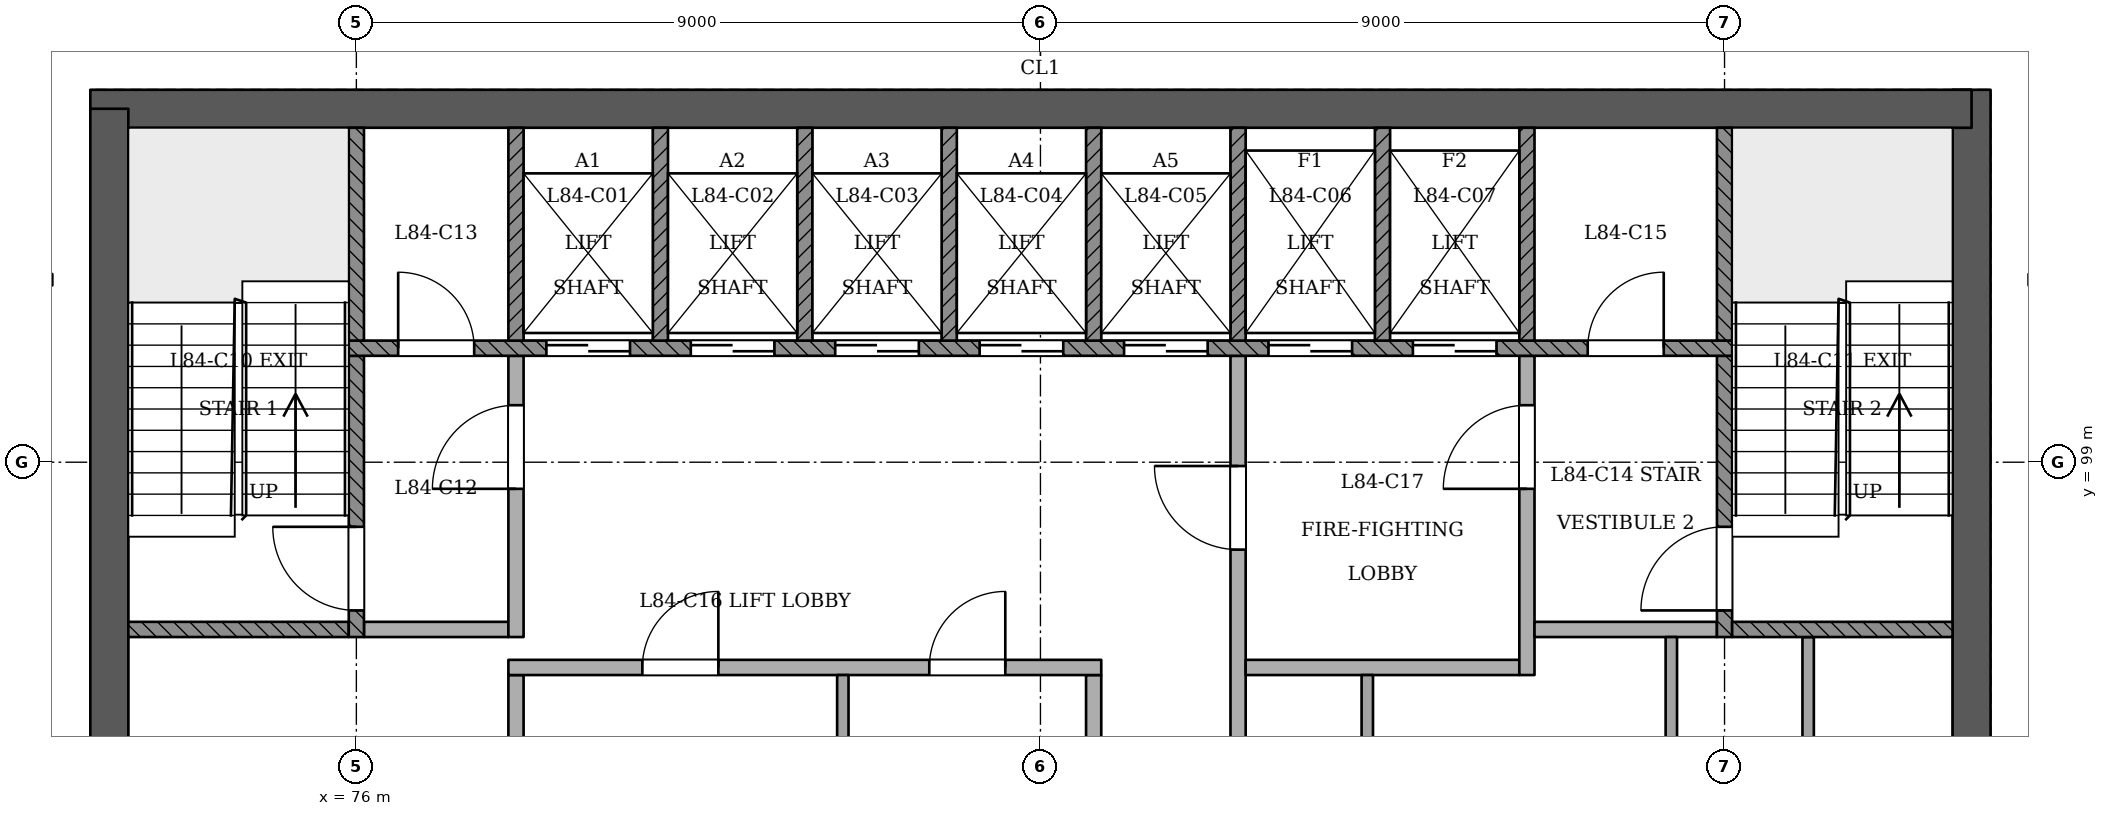
"""IFC4 building model, lengths in metres.
Left out: names, types, materials, properties, quantities, classifications, styles, units other than length and angle.
Written with IfcOpenShell. Run it as: python <this file> out.ifc"""

import sys

from ifc_helpers import new_model, si_unit, direction, frame, frame_2d, origin, place, context, subcontext, project, spatial, rectangle, extrude, element, fill, save


model = new_model("IFC4")
c1 = context("Model", 3, precision=1e-05, world=origin(), true_north=direction((0.0, 1.0)))
c2 = subcontext(c1, "Body", "Model", "MODEL_VIEW")
j1 = project(units=[si_unit("LENGTHUNIT", "METRE"), si_unit("PLANEANGLEUNIT", "RADIAN")], contexts=[c1])
p1 = place(None, origin())
s1 = spatial("IfcSite", under=j1, at=p1, CompositionType="ELEMENT")
p2 = place(p1, origin())
s2 = spatial("IfcBuilding", under=s1, at=p2, CompositionType="ELEMENT")
p3 = place(p2, frame((0.0, 0.0, 323.8)))
s3 = spatial("IfcBuildingStorey", under=s2, at=p3, CompositionType="ELEMENT", Elevation=323.8)
p4 = place(p3, frame((97.25, 93.15, 0.0), z_axis=(0.0, 0.0, 1.0), x_axis=(0.0, 1.0, 0.0)))
e1 = element("IfcWall", 1, at=p4, inside=s3, PredefinedType="SHEAR", context=c2, shape_type="SweptSolid", body=[
    extrude(rectangle(XDim=10.75, YDim=0.5, at=frame_2d((5.375, 0.0))), origin(), (0.0, 0.0, 1.0), 3.6),
])
p5 = place(p3, frame((97.25, 103.65, 0.0), z_axis=(0.0, 0.0, 1.0), x_axis=(-1.0, 0.0, 0.0)))
e2 = element("IfcWall", 2, at=p5, inside=s3, PredefinedType="SHEAR", context=c2, shape_type="SweptSolid", body=[
    extrude(rectangle(XDim=24.75, YDim=0.5, at=frame_2d((12.375, 0.0))), origin(), (0.0, 0.0, 1.0), 3.6),
])
p6 = place(p3, frame((72.75, 103.65, 0.0), z_axis=(0.0, 0.0, 1.0), x_axis=(0.0, -1.0, 0.0)))
e3 = element("IfcWall", 3, at=p6, inside=s3, PredefinedType="SHEAR", context=c2, shape_type="SweptSolid", body=[
    extrude(rectangle(XDim=10.75, YDim=0.5, at=frame_2d((5.375, 0.0))), origin(), (0.0, 0.0, 1.0), 3.6),
])
p7 = place(p3, frame((78.1, 93.4, 0.0), z_axis=(0.0, 0.0, 1.0), x_axis=(0.0, 1.0, 0.0)))
e4 = element("IfcWall", 4, at=p7, inside=s3, PredefinedType="PARTITIONING", context=c2, shape_type="SweptSolid", body=[
    extrude(rectangle(XDim=2.8, YDim=0.2, at=frame_2d((1.4, 0.0))), origin(), (0.0, 0.0, 1.0), 3.2),
])
p8 = place(p3, frame((82.4, 93.4, 0.0), z_axis=(0.0, 0.0, 1.0), x_axis=(0.0, 1.0, 0.0)))
e5 = element("IfcWall", 5, at=p8, inside=s3, PredefinedType="PARTITIONING", context=c2, shape_type="SweptSolid", body=[
    extrude(rectangle(XDim=2.8, YDim=0.15, at=frame_2d((1.4, 0.0))), origin(), (0.0, 0.0, 1.0), 3.2),
])
p9 = place(p3, frame((85.7, 93.4, 0.0), z_axis=(0.0, 0.0, 1.0), x_axis=(0.0, 1.0, 0.0)))
e6 = element("IfcWall", 6, at=p9, inside=s3, PredefinedType="PARTITIONING", context=c2, shape_type="SweptSolid", body=[
    extrude(rectangle(XDim=2.8, YDim=0.2, at=frame_2d((1.4, 0.0))), origin(), (0.0, 0.0, 1.0), 3.2),
])
p10 = place(p3, frame((87.6, 93.4, 0.0), z_axis=(0.0, 0.0, 1.0), x_axis=(0.0, 1.0, 0.0)))
e7 = element("IfcWall", 7, at=p10, inside=s3, PredefinedType="PARTITIONING", context=c2, shape_type="SweptSolid", body=[
    extrude(rectangle(XDim=7.0, YDim=0.2, at=frame_2d((3.5, 0.0))), origin(), (0.0, 0.0, 1.0), 3.2),
])
p11 = place(p10, frame((4.45, 0.0, 0.0)))
e8 = element("IfcOpeningElement", 8, at=p11, cuts=e7, PredefinedType="OPENING", context=c2, shape_type="SweptSolid", body=[
    extrude(rectangle(XDim=1.1, YDim=2.1, at=frame_2d((0.55, 1.05))), frame((0.0, 0.11, 0.0), z_axis=(0.0, -1.0, 0.0), x_axis=(1.0, 0.0, 0.0)), (0.0, 0.0, 1.0), 0.221),
])
p12 = place(p3, frame((89.3, 93.4, 0.0), z_axis=(0.0, 0.0, 1.0), x_axis=(0.0, 1.0, 0.0)))
e9 = element("IfcWall", 9, at=p12, inside=s3, PredefinedType="PARTITIONING", context=c2, shape_type="SweptSolid", body=[
    extrude(rectangle(XDim=2.8, YDim=0.15, at=frame_2d((1.4, 0.0))), origin(), (0.0, 0.0, 1.0), 3.2),
])
for number, where, z_axis, x_axis in (
    (10, (93.3, 93.4, 0.0), (0.0, 0.0, 1.0), (0.0, 1.0, 0.0)),
    (11, (95.1, 93.4, 0.0), (0.0, 0.0, 1.0), (0.0, 1.0, 0.0)),
):
    element("IfcWall", number, at=place(p3, frame(where, z_axis=z_axis, x_axis=x_axis)), inside=s3, PredefinedType="PARTITIONING", context=c2, shape_type="SweptSolid", body=[
        extrude(rectangle(XDim=3.3, YDim=0.15, at=frame_2d((1.65, 0.0))), origin(), (0.0, 0.0, 1.0), 3.2),
    ])
p13 = place(p3, frame((78.0, 96.3, 0.0), z_axis=(0.0, 0.0, 1.0), x_axis=(1.0, 0.0, 0.0)))
e12 = element("IfcWall", 12, at=p13, inside=s3, PredefinedType="PARTITIONING", context=c2, shape_type="SweptSolid", body=[
    extrude(rectangle(XDim=7.8, YDim=0.2, at=frame_2d((3.9, 0.0))), origin(), (0.0, 0.0, 1.0), 3.2),
])
p14 = place(p13, frame((1.762, 0.0, 0.0)))
e13 = element("IfcOpeningElement", 13, at=p14, cuts=e12, PredefinedType="OPENING", context=c2, shape_type="SweptSolid", body=[
    extrude(rectangle(XDim=1.0, YDim=2.1, at=frame_2d((0.5, 1.05))), frame((0.0, 0.11, 0.0), z_axis=(0.0, -1.0, 0.0), x_axis=(1.0, 0.0, 0.0)), (0.0, 0.0, 1.0), 0.221),
])
p15 = place(p13, frame((5.538, 0.0, 0.0)))
e14 = element("IfcOpeningElement", 14, at=p15, cuts=e12, PredefinedType="OPENING", context=c2, shape_type="SweptSolid", body=[
    extrude(rectangle(XDim=1.0, YDim=2.1, at=frame_2d((0.5, 1.05))), frame((0.0, 0.11, 0.0), z_axis=(0.0, -1.0, 0.0), x_axis=(1.0, 0.0, 0.0)), (0.0, 0.0, 1.0), 0.221),
])
p16 = place(p3, frame((87.7, 96.3, 0.0), z_axis=(0.0, 0.0, 1.0), x_axis=(1.0, 0.0, 0.0)))
e15 = element("IfcWall", 15, at=p16, inside=s3, PredefinedType="PARTITIONING", context=c2, shape_type="SweptSolid", body=[
    extrude(rectangle(XDim=3.6, YDim=0.2, at=frame_2d((1.8, 0.0))), origin(), (0.0, 0.0, 1.0), 3.2),
])
p17 = place(p3, frame((91.4, 96.2, 0.0), z_axis=(0.0, 0.0, 1.0), x_axis=(0.0, 1.0, 0.0)))
e16 = element("IfcWall", 16, at=p17, inside=s3, PredefinedType="PARTITIONING", context=c2, shape_type="SweptSolid", body=[
    extrude(rectangle(XDim=4.2, YDim=0.2, at=frame_2d((2.1, 0.0))), origin(), (0.0, 0.0, 1.0), 3.2),
])
p18 = place(p17, frame((2.45, 0.0, 0.0)))
e17 = element("IfcOpeningElement", 17, at=p18, cuts=e16, PredefinedType="OPENING", context=c2, shape_type="SweptSolid", body=[
    extrude(rectangle(XDim=1.1, YDim=2.1, at=frame_2d((0.55, 1.05))), frame((0.0, 0.11, 0.0), z_axis=(0.0, -1.0, 0.0), x_axis=(1.0, 0.0, 0.0)), (0.0, 0.0, 1.0), 0.221),
])
p19 = place(p3, frame((73.0, 96.8, 0.0), z_axis=(0.0, 0.0, 1.0), x_axis=(1.0, 0.0, 0.0)))
e18 = element("IfcWall", 18, at=p19, inside=s3, PredefinedType="SOLIDWALL", context=c2, shape_type="SweptSolid", body=[
    extrude(rectangle(XDim=2.9, YDim=0.2, at=frame_2d((1.45, 0.0))), origin(), (0.0, 0.0, 1.0), 3.2),
])
p20 = place(p3, frame((76.0, 96.7, 0.0), z_axis=(0.0, 0.0, 1.0), x_axis=(0.0, 1.0, 0.0)))
e19 = element("IfcWall", 19, at=p20, inside=s3, PredefinedType="SOLIDWALL", context=c2, shape_type="SweptSolid", body=[
    extrude(rectangle(XDim=3.7, YDim=0.2, at=frame_2d((1.85, 0.0))), origin(), (0.0, 0.0, 1.0), 3.2),
])
p21 = place(p20, frame((0.35, 0.0, 0.0)))
e20 = element("IfcOpeningElement", 20, at=p21, cuts=e19, PredefinedType="OPENING", context=c2, shape_type="SweptSolid", body=[
    extrude(rectangle(XDim=1.1, YDim=2.1, at=frame_2d((0.55, 1.05))), frame((0.0, 0.11, 0.0), z_axis=(0.0, -1.0, 0.0), x_axis=(1.0, 0.0, 0.0)), (0.0, 0.0, 1.0), 0.221),
])
p22 = place(p3, frame((76.1, 96.8, 0.0), z_axis=(0.0, 0.0, 1.0), x_axis=(1.0, 0.0, 0.0)))
e21 = element("IfcWall", 21, at=p22, inside=s3, PredefinedType="PARTITIONING", context=c2, shape_type="SweptSolid", body=[
    extrude(rectangle(XDim=1.9, YDim=0.2, at=frame_2d((0.95, 0.0))), origin(), (0.0, 0.0, 1.0), 3.2),
])
p23 = place(p3, frame((78.1, 96.7, 0.0), z_axis=(0.0, 0.0, 1.0), x_axis=(0.0, 1.0, 0.0)))
e22 = element("IfcWall", 22, at=p23, inside=s3, PredefinedType="PARTITIONING", context=c2, shape_type="SweptSolid", body=[
    extrude(rectangle(XDim=3.7, YDim=0.2, at=frame_2d((1.85, 0.0))), origin(), (0.0, 0.0, 1.0), 3.2),
])
p24 = place(p23, frame((1.95, 0.0, 0.0)))
e23 = element("IfcOpeningElement", 23, at=p24, cuts=e22, PredefinedType="OPENING", context=c2, shape_type="SweptSolid", body=[
    extrude(rectangle(XDim=1.1, YDim=2.1, at=frame_2d((0.55, 1.05))), frame((0.0, 0.11, 0.0), z_axis=(0.0, -1.0, 0.0), x_axis=(1.0, 0.0, 0.0)), (0.0, 0.0, 1.0), 0.221),
])
p25 = place(p3, frame((91.5, 96.8, 0.0), z_axis=(0.0, 0.0, 1.0), x_axis=(1.0, 0.0, 0.0)))
e24 = element("IfcWall", 24, at=p25, inside=s3, PredefinedType="PARTITIONING", context=c2, shape_type="SweptSolid", body=[
    extrude(rectangle(XDim=2.4, YDim=0.2, at=frame_2d((1.2, 0.0))), origin(), (0.0, 0.0, 1.0), 3.2),
])
p26 = place(p3, frame((94.0, 96.7, 0.0), z_axis=(0.0, 0.0, 1.0), x_axis=(0.0, 1.0, 0.0)))
e25 = element("IfcWall", 25, at=p26, inside=s3, PredefinedType="SOLIDWALL", context=c2, shape_type="SweptSolid", body=[
    extrude(rectangle(XDim=3.7, YDim=0.2, at=frame_2d((1.85, 0.0))), origin(), (0.0, 0.0, 1.0), 3.2),
])
p27 = place(p26, frame((0.35, 0.0, 0.0)))
e26 = element("IfcOpeningElement", 26, at=p27, cuts=e25, PredefinedType="OPENING", context=c2, shape_type="SweptSolid", body=[
    extrude(rectangle(XDim=1.1, YDim=2.1, at=frame_2d((0.55, 1.05))), frame((0.0, 0.11, 0.0), z_axis=(0.0, -1.0, 0.0), x_axis=(1.0, 0.0, 0.0)), (0.0, 0.0, 1.0), 0.221),
])
p28 = place(p3, frame((94.1, 96.8, 0.0), z_axis=(0.0, 0.0, 1.0), x_axis=(1.0, 0.0, 0.0)))
e27 = element("IfcWall", 27, at=p28, inside=s3, PredefinedType="SOLIDWALL", context=c2, shape_type="SweptSolid", body=[
    extrude(rectangle(XDim=2.9, YDim=0.2, at=frame_2d((1.45, 0.0))), origin(), (0.0, 0.0, 1.0), 3.2),
])
p29 = place(p3, frame((75.9, 100.5, 0.0), z_axis=(0.0, 0.0, 1.0), x_axis=(1.0, 0.0, 0.0)))
e28 = element("IfcWall", 28, at=p29, inside=s3, PredefinedType="SOLIDWALL", context=c2, shape_type="SweptSolid", body=[
    extrude(rectangle(XDim=18.2, YDim=0.2, at=frame_2d((9.1, 0.0))), origin(), (0.0, 0.0, 1.0), 3.2),
])
p30 = place(p29, frame((2.6, 0.0, 0.0)))
e29 = element("IfcOpeningElement", 29, at=p30, cuts=e28, PredefinedType="OPENING", context=c2, shape_type="SweptSolid", body=[
    extrude(rectangle(XDim=1.1, YDim=2.1, at=frame_2d((0.55, 1.05))), frame((0.0, 0.11, 0.0), z_axis=(0.0, -1.0, 0.0), x_axis=(1.0, 0.0, 0.0)), (0.0, 0.0, 1.0), 0.221),
])
p31 = place(p29, frame((4.5, 0.0, 0.0)))
e30 = element("IfcOpeningElement", 30, at=p31, cuts=e28, PredefinedType="OPENING", context=c2, shape_type="SweptSolid", body=[
    extrude(rectangle(XDim=1.1, YDim=2.1, at=frame_2d((0.55, 1.05))), frame((0.0, 0.11, 0.0), z_axis=(0.0, -1.0, 0.0), x_axis=(1.0, 0.0, 0.0)), (0.0, 0.0, 1.0), 0.221),
])
p32 = place(p29, frame((6.4, 0.0, 0.0)))
e31 = element("IfcOpeningElement", 31, at=p32, cuts=e28, PredefinedType="OPENING", context=c2, shape_type="SweptSolid", body=[
    extrude(rectangle(XDim=1.1, YDim=2.1, at=frame_2d((0.55, 1.05))), frame((0.0, 0.11, 0.0), z_axis=(0.0, -1.0, 0.0), x_axis=(1.0, 0.0, 0.0)), (0.0, 0.0, 1.0), 0.221),
])
p33 = place(p29, frame((8.3, 0.0, 0.0)))
e32 = element("IfcOpeningElement", 32, at=p33, cuts=e28, PredefinedType="OPENING", context=c2, shape_type="SweptSolid", body=[
    extrude(rectangle(XDim=1.1, YDim=2.1, at=frame_2d((0.55, 1.05))), frame((0.0, 0.11, 0.0), z_axis=(0.0, -1.0, 0.0), x_axis=(1.0, 0.0, 0.0)), (0.0, 0.0, 1.0), 0.221),
])
p34 = place(p29, frame((10.2, 0.0, 0.0)))
e33 = element("IfcOpeningElement", 33, at=p34, cuts=e28, PredefinedType="OPENING", context=c2, shape_type="SweptSolid", body=[
    extrude(rectangle(XDim=1.1, YDim=2.1, at=frame_2d((0.55, 1.05))), frame((0.0, 0.11, 0.0), z_axis=(0.0, -1.0, 0.0), x_axis=(1.0, 0.0, 0.0)), (0.0, 0.0, 1.0), 0.221),
])
p35 = place(p29, frame((12.1, 0.0, 0.0)))
e34 = element("IfcOpeningElement", 34, at=p35, cuts=e28, PredefinedType="OPENING", context=c2, shape_type="SweptSolid", body=[
    extrude(rectangle(XDim=1.1, YDim=2.1, at=frame_2d((0.55, 1.05))), frame((0.0, 0.11, 0.0), z_axis=(0.0, -1.0, 0.0), x_axis=(1.0, 0.0, 0.0)), (0.0, 0.0, 1.0), 0.221),
])
p36 = place(p29, frame((14.0, 0.0, 0.0)))
e35 = element("IfcOpeningElement", 35, at=p36, cuts=e28, PredefinedType="OPENING", context=c2, shape_type="SweptSolid", body=[
    extrude(rectangle(XDim=1.1, YDim=2.1, at=frame_2d((0.55, 1.05))), frame((0.0, 0.11, 0.0), z_axis=(0.0, -1.0, 0.0), x_axis=(1.0, 0.0, 0.0)), (0.0, 0.0, 1.0), 0.221),
])
p37 = place(p29, frame((0.65, 0.0, 0.0)))
e36 = element("IfcOpeningElement", 36, at=p37, cuts=e28, PredefinedType="OPENING", context=c2, shape_type="SweptSolid", body=[
    extrude(rectangle(XDim=1.0, YDim=2.1, at=frame_2d((0.5, 1.05))), frame((0.0, 0.11, 0.0), z_axis=(0.0, -1.0, 0.0), x_axis=(1.0, 0.0, 0.0)), (0.0, 0.0, 1.0), 0.221),
])
p38 = place(p29, frame((16.3, 0.0, 0.0)))
e37 = element("IfcOpeningElement", 37, at=p38, cuts=e28, PredefinedType="OPENING", context=c2, shape_type="SweptSolid", body=[
    extrude(rectangle(XDim=1.0, YDim=2.1, at=frame_2d((0.5, 1.05))), frame((0.0, 0.11, 0.0), z_axis=(0.0, -1.0, 0.0), x_axis=(1.0, 0.0, 0.0)), (0.0, 0.0, 1.0), 0.221),
])
for number, where, z_axis, x_axis in (
    (38, (76.0, 100.6, 0.0), (0.0, 0.0, 1.0), (0.0, 1.0, 0.0)),
    (39, (78.1, 100.6, 0.0), (0.0, 0.0, 1.0), (0.0, 1.0, 0.0)),
    (40, (80.0, 100.6, 0.0), (0.0, 0.0, 1.0), (0.0, 1.0, 0.0)),
    (41, (81.9, 100.6, 0.0), (0.0, 0.0, 1.0), (0.0, 1.0, 0.0)),
    (42, (83.8, 100.6, 0.0), (0.0, 0.0, 1.0), (0.0, 1.0, 0.0)),
    (43, (85.7, 100.6, 0.0), (0.0, 0.0, 1.0), (0.0, 1.0, 0.0)),
    (44, (87.6, 100.6, 0.0), (0.0, 0.0, 1.0), (0.0, 1.0, 0.0)),
    (45, (89.5, 100.6, 0.0), (0.0, 0.0, 1.0), (0.0, 1.0, 0.0)),
    (46, (91.4, 100.6, 0.0), (0.0, 0.0, 1.0), (0.0, 1.0, 0.0)),
    (47, (94.0, 100.6, 0.0), (0.0, 0.0, 1.0), (0.0, 1.0, 0.0)),
):
    element("IfcWall", number, at=place(p3, frame(where, z_axis=z_axis, x_axis=x_axis)), inside=s3, PredefinedType="SOLIDWALL", context=c2, shape_type="SweptSolid", body=[
        extrude(rectangle(XDim=2.8, YDim=0.2, at=frame_2d((1.4, 0.0))), origin(), (0.0, 0.0, 1.0), 3.2),
    ])
p39 = place(p30, origin())
e48 = element("IfcDoor", 48, at=p39, inside=s3, OperationType="SLIDING_TO_RIGHT", PredefinedType="NOTDEFINED", context=c2, shape_type="SweptSolid", body=[
    extrude(rectangle(XDim=1.1, YDim=2.1, at=frame_2d((0.55, 1.05))), frame((0.0, 0.025, 0.0), z_axis=(0.0, -1.0, 0.0), x_axis=(1.0, 0.0, 0.0)), (0.0, 0.0, 1.0), 0.05),
])
fill(e29, e48)
p40 = place(p31, origin())
e49 = element("IfcDoor", 49, at=p40, inside=s3, OperationType="SLIDING_TO_LEFT", PredefinedType="NOTDEFINED", context=c2, shape_type="SweptSolid", body=[
    extrude(rectangle(XDim=1.1, YDim=2.1, at=frame_2d((0.55, 1.05))), frame((0.0, 0.025, 0.0), z_axis=(0.0, -1.0, 0.0), x_axis=(1.0, 0.0, 0.0)), (0.0, 0.0, 1.0), 0.05),
])
fill(e30, e49)
p41 = place(p32, origin())
e50 = element("IfcDoor", 50, at=p41, inside=s3, OperationType="SLIDING_TO_RIGHT", PredefinedType="NOTDEFINED", context=c2, shape_type="SweptSolid", body=[
    extrude(rectangle(XDim=1.1, YDim=2.1, at=frame_2d((0.55, 1.05))), frame((0.0, 0.025, 0.0), z_axis=(0.0, -1.0, 0.0), x_axis=(1.0, 0.0, 0.0)), (0.0, 0.0, 1.0), 0.05),
])
fill(e31, e50)
p42 = place(p33, origin())
e51 = element("IfcDoor", 51, at=p42, inside=s3, OperationType="SLIDING_TO_LEFT", PredefinedType="NOTDEFINED", context=c2, shape_type="SweptSolid", body=[
    extrude(rectangle(XDim=1.1, YDim=2.1, at=frame_2d((0.55, 1.05))), frame((0.0, 0.025, 0.0), z_axis=(0.0, -1.0, 0.0), x_axis=(1.0, 0.0, 0.0)), (0.0, 0.0, 1.0), 0.05),
])
fill(e32, e51)
p43 = place(p34, origin())
e52 = element("IfcDoor", 52, at=p43, inside=s3, OperationType="SLIDING_TO_RIGHT", PredefinedType="NOTDEFINED", context=c2, shape_type="SweptSolid", body=[
    extrude(rectangle(XDim=1.1, YDim=2.1, at=frame_2d((0.55, 1.05))), frame((0.0, 0.025, 0.0), z_axis=(0.0, -1.0, 0.0), x_axis=(1.0, 0.0, 0.0)), (0.0, 0.0, 1.0), 0.05),
])
fill(e33, e52)
p44 = place(p35, origin())
e53 = element("IfcDoor", 53, at=p44, inside=s3, OperationType="SLIDING_TO_RIGHT", PredefinedType="NOTDEFINED", context=c2, shape_type="SweptSolid", body=[
    extrude(rectangle(XDim=1.1, YDim=2.1, at=frame_2d((0.55, 1.05))), frame((0.0, 0.025, 0.0), z_axis=(0.0, -1.0, 0.0), x_axis=(1.0, 0.0, 0.0)), (0.0, 0.0, 1.0), 0.05),
])
fill(e34, e53)
p45 = place(p36, origin())
e54 = element("IfcDoor", 54, at=p45, inside=s3, OperationType="SLIDING_TO_LEFT", PredefinedType="NOTDEFINED", context=c2, shape_type="SweptSolid", body=[
    extrude(rectangle(XDim=1.1, YDim=2.1, at=frame_2d((0.55, 1.05))), frame((0.0, 0.025, 0.0), z_axis=(0.0, -1.0, 0.0), x_axis=(1.0, 0.0, 0.0)), (0.0, 0.0, 1.0), 0.05),
])
fill(e35, e54)
p46 = place(p21, origin())
e55 = element("IfcDoor", 55, at=p46, inside=s3, OperationType="SINGLE_SWING_RIGHT", PredefinedType="NOTDEFINED", context=c2, shape_type="SweptSolid", body=[
    extrude(rectangle(XDim=1.1, YDim=2.1, at=frame_2d((0.55, 1.05))), frame((0.0, 0.025, 0.0), z_axis=(0.0, -1.0, 0.0), x_axis=(1.0, 0.0, 0.0)), (0.0, 0.0, 1.0), 0.05),
])
fill(e20, e55)
p47 = place(p27, origin())
e56 = element("IfcDoor", 56, at=p47, inside=s3, OperationType="SINGLE_SWING_LEFT", PredefinedType="NOTDEFINED", context=c2, shape_type="SweptSolid", body=[
    extrude(rectangle(XDim=1.1, YDim=2.1, at=frame_2d((0.55, 1.05))), frame((0.0, 0.025, 0.0), z_axis=(0.0, -1.0, 0.0), x_axis=(1.0, 0.0, 0.0)), (0.0, 0.0, 1.0), 0.05),
])
fill(e26, e56)
p48 = place(p24, origin())
e57 = element("IfcDoor", 57, at=p48, inside=s3, OperationType="SINGLE_SWING_LEFT", PredefinedType="NOTDEFINED", context=c2, shape_type="SweptSolid", body=[
    extrude(rectangle(XDim=1.1, YDim=2.1, at=frame_2d((0.55, 1.05))), frame((0.0, 0.025, 0.0), z_axis=(0.0, -1.0, 0.0), x_axis=(1.0, 0.0, 0.0)), (0.0, 0.0, 1.0), 0.05),
])
fill(e23, e57)
p49 = place(p11, origin())
e58 = element("IfcDoor", 58, at=p49, inside=s3, OperationType="SINGLE_SWING_RIGHT", PredefinedType="NOTDEFINED", context=c2, shape_type="SweptSolid", body=[
    extrude(rectangle(XDim=1.1, YDim=2.1, at=frame_2d((0.55, 1.05))), frame((0.0, 0.025, 0.0), z_axis=(0.0, -1.0, 0.0), x_axis=(1.0, 0.0, 0.0)), (0.0, 0.0, 1.0), 0.05),
])
fill(e8, e58)
p50 = place(p18, origin())
e59 = element("IfcDoor", 59, at=p50, inside=s3, OperationType="SINGLE_SWING_LEFT", PredefinedType="NOTDEFINED", context=c2, shape_type="SweptSolid", body=[
    extrude(rectangle(XDim=1.1, YDim=2.1, at=frame_2d((0.55, 1.05))), frame((0.0, 0.025, 0.0), z_axis=(0.0, -1.0, 0.0), x_axis=(1.0, 0.0, 0.0)), (0.0, 0.0, 1.0), 0.05),
])
fill(e17, e59)
p51 = place(p37, origin())
e60 = element("IfcDoor", 60, at=p51, inside=s3, OperationType="SINGLE_SWING_LEFT", PredefinedType="NOTDEFINED", context=c2, shape_type="SweptSolid", body=[
    extrude(rectangle(XDim=1.0, YDim=2.1, at=frame_2d((0.5, 1.05))), frame((0.0, 0.025, 0.0), z_axis=(0.0, -1.0, 0.0), x_axis=(1.0, 0.0, 0.0)), (0.0, 0.0, 1.0), 0.05),
])
fill(e36, e60)
p52 = place(p38, origin())
e61 = element("IfcDoor", 61, at=p52, inside=s3, OperationType="SINGLE_SWING_RIGHT", PredefinedType="NOTDEFINED", context=c2, shape_type="SweptSolid", body=[
    extrude(rectangle(XDim=1.0, YDim=2.1, at=frame_2d((0.5, 1.05))), frame((0.0, 0.025, 0.0), z_axis=(0.0, -1.0, 0.0), x_axis=(1.0, 0.0, 0.0)), (0.0, 0.0, 1.0), 0.05),
])
fill(e37, e61)
p53 = place(p14, origin())
e62 = element("IfcDoor", 62, at=p53, inside=s3, OperationType="SINGLE_SWING_RIGHT", PredefinedType="NOTDEFINED", context=c2, shape_type="SweptSolid", body=[
    extrude(rectangle(XDim=1.0, YDim=2.1, at=frame_2d((0.5, 1.05))), frame((0.0, 0.025, 0.0), z_axis=(0.0, -1.0, 0.0), x_axis=(1.0, 0.0, 0.0)), (0.0, 0.0, 1.0), 0.05),
])
fill(e13, e62)
p54 = place(p15, origin())
e63 = element("IfcDoor", 63, at=p54, inside=s3, OperationType="SINGLE_SWING_RIGHT", PredefinedType="NOTDEFINED", context=c2, shape_type="SweptSolid", body=[
    extrude(rectangle(XDim=1.0, YDim=2.1, at=frame_2d((0.5, 1.05))), frame((0.0, 0.025, 0.0), z_axis=(0.0, -1.0, 0.0), x_axis=(1.0, 0.0, 0.0)), (0.0, 0.0, 1.0), 0.05),
])
fill(e14, e63)
save(model, sys.argv[1])
